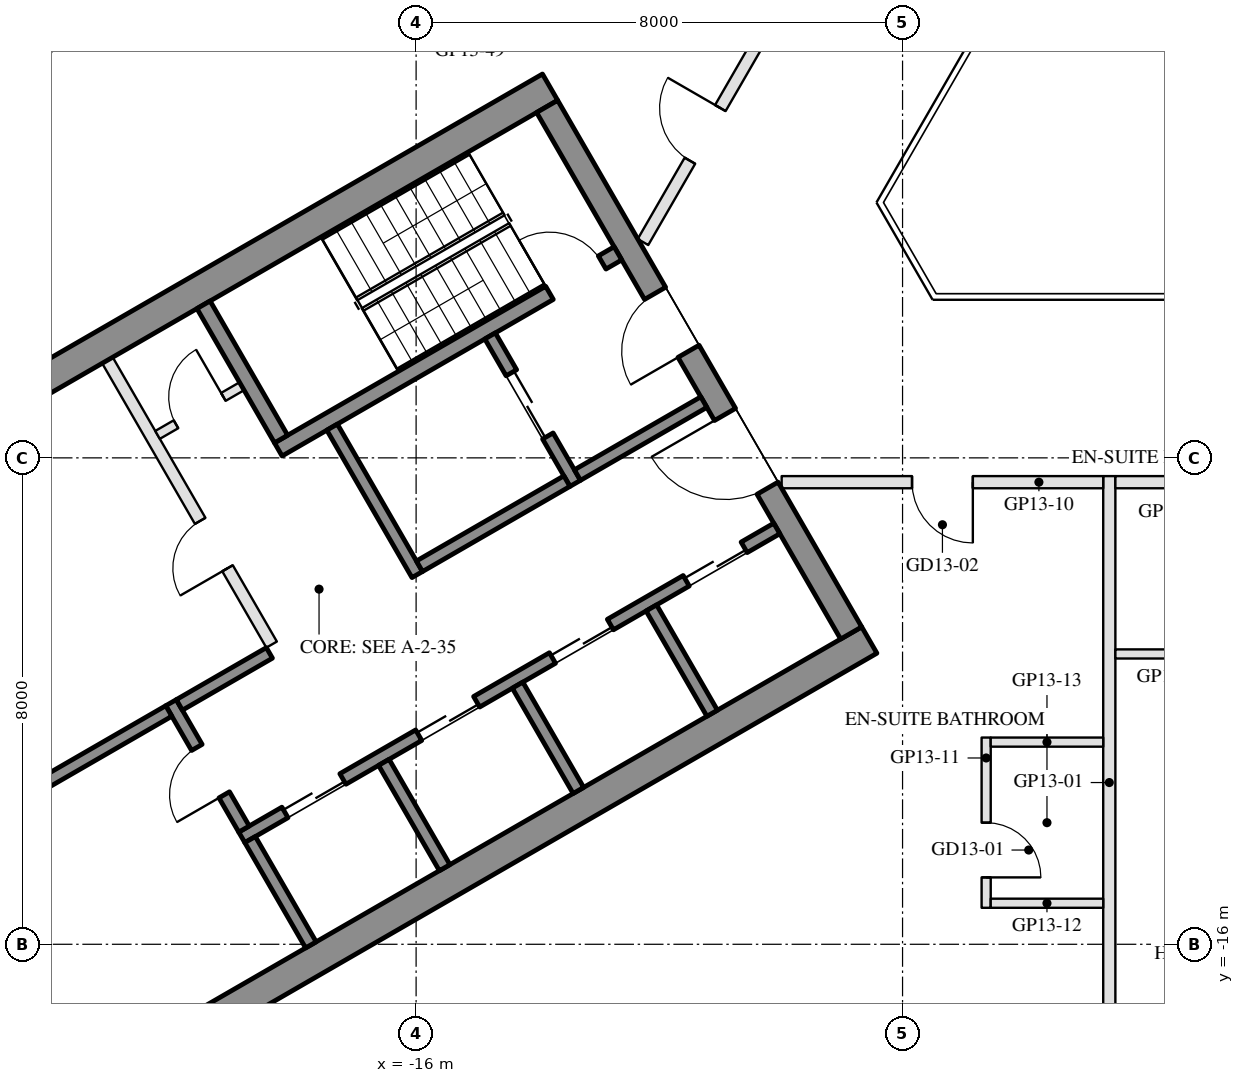
"""IFC4 building model, lengths in metres.
Left out: names, types, materials, properties, quantities, classifications, styles, units other than length and angle.
Written with IfcOpenShell. Run it as: python <this file> out.ifc"""

import sys

from ifc_helpers import new_model, si_unit, direction, frame, frame_2d, origin, place, context, subcontext, project, spatial, rectangle, extrude, element, fill, save


model = new_model("IFC4")
c1 = context("Model", 3, precision=1e-05, world=origin(), true_north=direction((0.0, 1.0)))
c2 = subcontext(c1, "Body", "Model", "MODEL_VIEW")
j1 = project(units=[si_unit("LENGTHUNIT", "METRE"), si_unit("PLANEANGLEUNIT", "RADIAN")], contexts=[c1])
p1 = place(None, origin())
s1 = spatial("IfcSite", under=j1, at=p1, CompositionType="ELEMENT")
p2 = place(p1, origin())
s2 = spatial("IfcBuilding", under=s1, at=p2, CompositionType="ELEMENT")
p3 = place(p2, frame((0.0, 0.0, 154.0)))
s3 = spatial("IfcBuildingStorey", under=s2, at=p3, CompositionType="ELEMENT", Elevation=154.0)
p4 = place(p3, frame((-20.309, 1.934, 0.0), z_axis=(0.0, 0.0, 1.0), x_axis=(-0.499992114976, -0.866029956157, 0.0)))
e1 = element("IfcWall", 1, at=p4, inside=s3, PredefinedType="SOLIDWALL", context=c2, shape_type="SweptSolid", body=[
    extrude(rectangle(XDim=6.74, YDim=0.35, at=frame_2d((3.37, 0.0))), origin(), (0.0, 0.0, 1.0), 3.55),
])
p5 = place(p4, frame((0.77, 0.0, 0.0)))
e2 = element("IfcOpeningElement", 2, at=p5, cuts=e1, PredefinedType="OPENING", context=c2, shape_type="SweptSolid", body=[
    extrude(rectangle(XDim=2.4, YDim=2.4, at=frame_2d((1.2, 1.2))), frame((0.0, 0.185, 0.0), z_axis=(0.0, -1.0, 0.0), x_axis=(1.0, 0.0, 0.0)), (0.0, 0.0, 1.0), 0.37),
])
p6 = place(p4, frame((3.47, 0.0, 0.3)))
e3 = element("IfcOpeningElement", 3, at=p6, cuts=e1, PredefinedType="OPENING", context=c2, shape_type="SweptSolid", body=[
    extrude(rectangle(XDim=2.9, YDim=2.65, at=frame_2d((1.45, 1.325))), frame((0.0, 0.185, 0.0), z_axis=(0.0, -1.0, 0.0), x_axis=(1.0, 0.0, 0.0)), (0.0, 0.0, 1.0), 0.37),
])
for number, where, z_axis, x_axis in (
    (4, (-13.797, -1.903, 0.0), (0.0, 0.0, 1.0), (-0.866, -0.5, 0.0)),
    (5, (-8.547, -10.997, 0.0), (0.0, 0.0, 1.0), (-0.866, -0.5, 0.0)),
):
    element("IfcWall", number, at=place(p3, frame(where, z_axis=z_axis, x_axis=x_axis)), inside=s3, PredefinedType="SHEAR", context=c2, shape_type="SweptSolid", body=[
        extrude(rectangle(XDim=14.837, YDim=0.5, at=frame_2d((7.418, 0.0))), origin(), (0.0, 0.0, 1.0), 3.5),
    ])
p7 = place(p3, frame((-13.845, -2.22, 0.0), z_axis=(0.0, 0.0, 1.0), x_axis=(0.500004234368, -0.866022959057, 0.0)))
e6 = element("IfcWall", 6, at=p7, inside=s3, PredefinedType="SHEAR", context=c2, shape_type="SweptSolid", body=[
    extrude(rectangle(XDim=10.0, YDim=0.4, at=frame_2d((5.0, 0.0))), origin(), (0.0, 0.0, 1.0), 3.5),
])
p8 = place(p7, frame((3.55, 0.0, 0.0)))
e7 = element("IfcOpeningElement", 7, at=p8, cuts=e6, PredefinedType="OPENING", context=c2, shape_type="SweptSolid", body=[
    extrude(rectangle(XDim=1.1, YDim=2.1, at=frame_2d((0.55, 1.05))), frame((0.0, 0.21, 0.0), z_axis=(0.0, -1.0, 0.0), x_axis=(1.0, 0.0, 0.0)), (0.0, 0.0, 1.0), 0.42),
])
p9 = place(p7, frame((5.85, 0.0, 0.0)))
e8 = element("IfcOpeningElement", 8, at=p9, cuts=e6, PredefinedType="OPENING", context=c2, shape_type="SweptSolid", body=[
    extrude(rectangle(XDim=1.4, YDim=2.1, at=frame_2d((0.7, 1.05))), frame((0.0, 0.21, 0.0), z_axis=(0.0, -1.0, 0.0), x_axis=(1.0, 0.0, 0.0)), (0.0, 0.0, 1.0), 0.42),
])
p10 = place(p3, frame((-12.681, -4.636, 0.0), z_axis=(0.0, 0.0, 1.0), x_axis=(-0.866021702275, -0.500006411147, 0.0)))
e9 = element("IfcWall", 9, at=p10, inside=s3, PredefinedType="SHEAR", context=c2, shape_type="SweptSolid", body=[
    extrude(rectangle(XDim=6.45, YDim=0.25, at=frame_2d((3.225, 0.0))), origin(), (0.0, 0.0, 1.0), 3.5),
])
p11 = place(p10, frame((0.3, 0.0, 0.0)))
e10 = element("IfcOpeningElement", 10, at=p11, cuts=e9, PredefinedType="OPENING", context=c2, shape_type="SweptSolid", body=[
    extrude(rectangle(XDim=1.0, YDim=2.1, at=frame_2d((0.5, 1.05))), frame((0.0, 0.135, 0.0), z_axis=(0.0, -1.0, 0.0), x_axis=(1.0, 0.0, 0.0)), (0.0, 0.0, 1.0), 0.27),
])
p12 = place(p3, frame((-19.496, -5.482, 0.0), z_axis=(0.0, 0.0, 1.0), x_axis=(0.499990435942, -0.866030925526, 0.0)))
e11 = element("IfcWall", 11, at=p12, inside=s3, PredefinedType="SHEAR", context=c2, shape_type="SweptSolid", body=[
    extrude(rectangle(XDim=2.55, YDim=0.25, at=frame_2d((1.275, 0.0))), origin(), (0.0, 0.0, 1.0), 3.5),
])
p13 = place(p3, frame((-17.381, -7.495, 0.0), z_axis=(0.0, 0.0, 1.0), x_axis=(0.500011755427, -0.866018616679, 0.0)))
e12 = element("IfcWall", 12, at=p13, inside=s3, PredefinedType="SHEAR", context=c2, shape_type="SweptSolid", body=[
    extrude(rectangle(XDim=2.8, YDim=0.2, at=frame_2d((1.4, 0.0))), origin(), (0.0, 0.0, 1.0), 3.5),
])
p14 = place(p3, frame((-14.783, -5.995, 0.0), z_axis=(0.0, 0.0, 1.0), x_axis=(0.49994636267, -0.866056369097, 0.0)))
e13 = element("IfcWall", 13, at=p14, inside=s3, PredefinedType="SHEAR", context=c2, shape_type="SweptSolid", body=[
    extrude(rectangle(XDim=2.8, YDim=0.2, at=frame_2d((1.4, 0.0))), origin(), (0.0, 0.0, 1.0), 3.5),
])
p15 = place(p14, frame((0.7, 0.0, 0.0)))
e14 = element("IfcOpeningElement", 14, at=p15, cuts=e13, PredefinedType="OPENING", context=c2, shape_type="SweptSolid", body=[
    extrude(rectangle(XDim=1.2, YDim=2.1, at=frame_2d((0.6, 1.05))), frame((0.0, 0.11, 0.0), z_axis=(0.0, -1.0, 0.0), x_axis=(1.0, 0.0, 0.0)), (0.0, 0.0, 1.0), 0.22),
])
p16 = place(p3, frame((-13.52, -8.383, 0.0), z_axis=(0.0, 0.0, 1.0), x_axis=(-0.866034573852, -0.49998411664, 0.0)))
e15 = element("IfcWall", 15, at=p16, inside=s3, PredefinedType="SHEAR", context=c2, shape_type="SweptSolid", body=[
    extrude(rectangle(XDim=2.8, YDim=0.2, at=frame_2d((1.4, 0.0))), origin(), (0.0, 0.0, 1.0), 3.5),
])
p17 = place(p3, frame((-11.268, -7.083, 0.0), z_axis=(0.0, 0.0, 1.0), x_axis=(-0.866050077142, -0.499957262057, 0.0)))
e16 = element("IfcWall", 16, at=p17, inside=s3, PredefinedType="SHEAR", context=c2, shape_type="SweptSolid", body=[
    extrude(rectangle(XDim=2.4, YDim=0.2, at=frame_2d((1.2, 0.0))), origin(), (0.0, 0.0, 1.0), 3.5),
])
p18 = place(p3, frame((-10.068, -9.162, 0.0), z_axis=(0.0, 0.0, 1.0), x_axis=(-0.866032725843, -0.499987317609, 0.0)))
e17 = element("IfcWall", 17, at=p18, inside=s3, PredefinedType="SHEAR", context=c2, shape_type="SweptSolid", body=[
    extrude(rectangle(XDim=10.16, YDim=0.2, at=frame_2d((5.08, 0.0))), origin(), (0.0, 0.0, 1.0), 3.5),
])
p19 = place(p18, frame((0.62, 0.0, 0.0)))
e18 = element("IfcOpeningElement", 18, at=p19, cuts=e17, PredefinedType="OPENING", context=c2, shape_type="SweptSolid", body=[
    extrude(rectangle(XDim=1.1, YDim=2.1, at=frame_2d((0.55, 1.05))), frame((0.0, 0.11, 0.0), z_axis=(0.0, -1.0, 0.0), x_axis=(1.0, 0.0, 0.0)), (0.0, 0.0, 1.0), 0.22),
])
p20 = place(p18, frame((3.16, 0.0, 0.0)))
e19 = element("IfcOpeningElement", 19, at=p20, cuts=e17, PredefinedType="OPENING", context=c2, shape_type="SweptSolid", body=[
    extrude(rectangle(XDim=1.1, YDim=2.1, at=frame_2d((0.55, 1.05))), frame((0.0, 0.11, 0.0), z_axis=(0.0, -1.0, 0.0), x_axis=(1.0, 0.0, 0.0)), (0.0, 0.0, 1.0), 0.22),
])
p21 = place(p18, frame((5.7, 0.0, 0.0)))
e20 = element("IfcOpeningElement", 20, at=p21, cuts=e17, PredefinedType="OPENING", context=c2, shape_type="SweptSolid", body=[
    extrude(rectangle(XDim=1.1, YDim=2.1, at=frame_2d((0.55, 1.05))), frame((0.0, 0.11, 0.0), z_axis=(0.0, -1.0, 0.0), x_axis=(1.0, 0.0, 0.0)), (0.0, 0.0, 1.0), 0.22),
])
p22 = place(p18, frame((8.24, 0.0, 0.0)))
e21 = element("IfcOpeningElement", 21, at=p22, cuts=e17, PredefinedType="OPENING", context=c2, shape_type="SweptSolid", body=[
    extrude(rectangle(XDim=1.1, YDim=2.1, at=frame_2d((0.55, 1.05))), frame((0.0, 0.11, 0.0), z_axis=(0.0, -1.0, 0.0), x_axis=(1.0, 0.0, 0.0)), (0.0, 0.0, 1.0), 0.22),
])
p23 = place(p3, frame((-20.031, -12.026, 0.0), z_axis=(0.0, 0.0, 1.0), x_axis=(0.500033551112, -0.866006032174, 0.0)))
e22 = element("IfcWall", 22, at=p23, inside=s3, PredefinedType="SHEAR", context=c2, shape_type="SweptSolid", body=[
    extrude(rectangle(XDim=2.4, YDim=0.2, at=frame_2d((1.2, 0.0))), origin(), (0.0, 0.0, 1.0), 3.5),
])
p24 = place(p23, frame((0.85, 0.0, 0.0)))
e23 = element("IfcOpeningElement", 23, at=p24, cuts=e22, PredefinedType="OPENING", context=c2, shape_type="SweptSolid", body=[
    extrude(rectangle(XDim=0.9, YDim=2.1, at=frame_2d((0.45, 1.05))), frame((0.0, 0.11, 0.0), z_axis=(0.0, -1.0, 0.0), x_axis=(1.0, 0.0, 0.0)), (0.0, 0.0, 1.0), 0.22),
])
p25 = place(p3, frame((-18.413, -11.208, 0.0), z_axis=(0.0, 0.0, 1.0), x_axis=(-0.866038183914, -0.499977863513, 0.0)))
e24 = element("IfcWall", 24, at=p25, inside=s3, PredefinedType="SHEAR", context=c2, shape_type="SweptSolid", body=[
    extrude(rectangle(XDim=1.71, YDim=0.2, at=frame_2d((0.855, 0.0))), origin(), (0.0, 0.0, 1.0), 3.5),
])
for number, where, z_axis, x_axis in (
    (25, (-12.131, -10.468, 0.0), (0.0, 0.0, 1.0), (0.5, -0.866, 0.0)),
    (26, (-14.331, -11.738, 0.0), (0.0, 0.0, 1.0), (0.5, -0.866, 0.0)),
    (27, (-16.531, -13.008, 0.0), (0.0, 0.0, 1.0), (0.5, -0.866, 0.0)),
    (28, (-18.73, -14.278, 0.0), (0.0, 0.0, 1.0), (0.5, -0.866, 0.0)),
):
    element("IfcWall", number, at=place(p3, frame(where, z_axis=z_axis, x_axis=x_axis)), inside=s3, PredefinedType="SHEAR", context=c2, shape_type="SweptSolid", body=[
        extrude(rectangle(XDim=2.0, YDim=0.2, at=frame_2d((1.0, 0.0))), origin(), (0.0, 0.0, 1.0), 3.5),
    ])
p26 = place(p3, frame((-20.067, -12.163, 0.0), z_axis=(0.0, 0.0, 1.0), x_axis=(-0.866055327414, -0.49994816717, 0.0)))
e29 = element("IfcWall", 29, at=p26, inside=s3, PredefinedType="SHEAR", context=c2, shape_type="SweptSolid", body=[
    extrude(rectangle(XDim=2.84, YDim=0.2, at=frame_2d((1.42, 0.0))), origin(), (0.0, 0.0, 1.0), 3.5),
])
p27 = place(p3, frame((-21.076, -6.395, 0.0), z_axis=(0.0, 0.0, 1.0), x_axis=(0.50001468107, -0.866016927499, 0.0)))
e30 = element("IfcWall", 30, at=p27, inside=s3, PredefinedType="PARTITIONING", context=c2, shape_type="SweptSolid", body=[
    extrude(rectangle(XDim=5.4, YDim=0.2, at=frame_2d((2.7, 0.0))), origin(), (0.0, 0.0, 1.0), 3.5),
])
p28 = place(p27, frame((3.05, 0.0, 0.0)))
e31 = element("IfcOpeningElement", 31, at=p28, cuts=e30, PredefinedType="OPENING", context=c2, shape_type="SweptSolid", body=[
    extrude(rectangle(XDim=0.9, YDim=2.1, at=frame_2d((0.45, 1.05))), frame((0.0, 0.11, 0.0), z_axis=(0.0, -1.0, 0.0), x_axis=(1.0, 0.0, 0.0)), (0.0, 0.0, 1.0), 0.22),
])
p29 = place(p3, frame((-18.866, -6.822, 0.0), z_axis=(0.0, 0.0, 1.0), x_axis=(-0.866028054938, -0.499995408039, 0.0)))
e32 = element("IfcWall", 32, at=p29, inside=s3, PredefinedType="PARTITIONING", context=c2, shape_type="SweptSolid", body=[
    extrude(rectangle(XDim=1.6, YDim=0.15, at=frame_2d((0.8, 0.0))), origin(), (0.0, 0.0, 1.0), 3.5),
])
p30 = place(p29, frame((0.35, 0.0, 0.0)))
e33 = element("IfcOpeningElement", 33, at=p30, cuts=e32, PredefinedType="OPENING", context=c2, shape_type="SweptSolid", body=[
    extrude(rectangle(XDim=0.9, YDim=2.1, at=frame_2d((0.45, 1.05))), frame((0.0, 0.085, 0.0), z_axis=(0.0, -1.0, 0.0), x_axis=(1.0, 0.0, 0.0)), (0.0, 0.0, 1.0), 0.17),
])
p31 = place(p3, frame((-4.6, -18.38, 0.0), z_axis=(0.0, 0.0, 1.0), x_axis=(0.0, 1.0, 0.0)))
e34 = element("IfcWall", 34, at=p31, inside=s3, PredefinedType="PARTITIONING", context=c2, shape_type="SweptSolid", body=[
    extrude(rectangle(XDim=10.08, YDim=0.2, at=frame_2d((5.04, 0.0))), origin(), (0.0, 0.0, 1.0), 3.06),
])
p32 = place(p3, frame((-4.7, -8.4, 0.0), z_axis=(0.0, 0.0, 1.0), x_axis=(-1.0, 0.0, 0.0)))
e35 = element("IfcWall", 35, at=p32, inside=s3, PredefinedType="PARTITIONING", context=c2, shape_type="SweptSolid", body=[
    extrude(rectangle(XDim=5.288, YDim=0.2, at=frame_2d((2.644, 0.0))), origin(), (0.0, 0.0, 1.0), 2.95),
])
p33 = place(p32, frame((2.144, 0.0, 0.0)))
e36 = element("IfcOpeningElement", 36, at=p33, cuts=e35, PredefinedType="OPENING", context=c2, shape_type="SweptSolid", body=[
    extrude(rectangle(XDim=1.0, YDim=2.1, at=frame_2d((0.5, 1.05))), frame((0.0, 0.11, 0.0), z_axis=(0.0, -1.0, 0.0), x_axis=(1.0, 0.0, 0.0)), (0.0, 0.0, 1.0), 0.22),
])
p34 = place(p3, frame((-6.625, -12.6, 0.0), z_axis=(0.0, 0.0, 1.0), x_axis=(0.0, -1.0, 0.0)))
e37 = element("IfcWall", 37, at=p34, inside=s3, PredefinedType="PARTITIONING", context=c2, shape_type="SweptSolid", body=[
    extrude(rectangle(XDim=2.8, YDim=0.15, at=frame_2d((1.4, 0.0))), origin(), (0.0, 0.0, 1.0), 3.55),
])
p35 = place(p34, frame((1.4, 0.0, 0.0)))
e38 = element("IfcOpeningElement", 38, at=p35, cuts=e37, PredefinedType="OPENING", context=c2, shape_type="SweptSolid", body=[
    extrude(rectangle(XDim=0.9, YDim=2.1, at=frame_2d((0.45, 1.05))), frame((0.0, 0.085, 0.0), z_axis=(0.0, -1.0, 0.0), x_axis=(1.0, 0.0, 0.0)), (0.0, 0.0, 1.0), 0.17),
])
for number, where, z_axis, x_axis in (
    (39, (-6.55, -15.325, 0.0), (0.0, 0.0, 1.0), (1.0, 0.0, 0.0)),
    (40, (-6.55, -12.675, 0.0), (0.0, 0.0, 1.0), (1.0, 0.0, 0.0)),
):
    element("IfcWall", number, at=place(p3, frame(where, z_axis=z_axis, x_axis=x_axis)), inside=s3, PredefinedType="PARTITIONING", context=c2, shape_type="SweptSolid", body=[
        extrude(rectangle(XDim=1.85, YDim=0.15, at=frame_2d((0.925, 0.0))), origin(), (0.0, 0.0, 1.0), 3.55),
    ])
p36 = place(p3, frame((0.304, -8.4, 0.0), z_axis=(0.0, 0.0, 1.0), x_axis=(-1.0, 0.0, 0.0)))
e41 = element("IfcWall", 41, at=p36, inside=s3, PredefinedType="PARTITIONING", context=c2, shape_type="SweptSolid", body=[
    extrude(rectangle(XDim=4.804, YDim=0.2, at=frame_2d((2.402, 0.0))), origin(), (0.0, 0.0, 1.0), 2.95),
])
p37 = place(p36, frame((1.354, 0.0, 0.0)))
e42 = element("IfcOpeningElement", 42, at=p37, cuts=e41, PredefinedType="OPENING", context=c2, shape_type="SweptSolid", body=[
    extrude(rectangle(XDim=1.0, YDim=2.1, at=frame_2d((0.5, 1.05))), frame((0.0, 0.11, 0.0), z_axis=(0.0, -1.0, 0.0), x_axis=(1.0, 0.0, 0.0)), (0.0, 0.0, 1.0), 0.22),
])
p38 = place(p3, frame((-4.5, -11.225, 0.0), z_axis=(0.0, 0.0, 1.0), x_axis=(1.0, 0.0, 0.0)))
e43 = element("IfcWall", 43, at=p38, inside=s3, PredefinedType="PARTITIONING", context=c2, shape_type="SweptSolid", body=[
    extrude(rectangle(XDim=1.85, YDim=0.15, at=frame_2d((0.925, 0.0))), origin(), (0.0, 0.0, 1.0), 2.95),
])
p39 = place(p3, frame((-12.269, -4.45, 0.0), z_axis=(0.0, 0.0, 1.0), x_axis=(0.500011931275, 0.86601851515, 0.0)))
e44 = element("IfcWall", 44, at=p39, inside=s3, PredefinedType="PARTITIONING", context=c2, shape_type="SweptSolid", body=[
    extrude(rectangle(XDim=4.088, YDim=0.2, at=frame_2d((2.044, 0.0))), origin(), (0.0, 0.0, 1.0), 2.95),
])
p40 = place(p39, frame((1.544, 0.0, 0.0)))
e45 = element("IfcOpeningElement", 45, at=p40, cuts=e44, PredefinedType="OPENING", context=c2, shape_type="SweptSolid", body=[
    extrude(rectangle(XDim=1.0, YDim=2.1, at=frame_2d((0.5, 1.05))), frame((0.0, 0.11, 0.0), z_axis=(0.0, -1.0, 0.0), x_axis=(1.0, 0.0, 0.0)), (0.0, 0.0, 1.0), 0.22),
])
p41 = place(p15, origin())
e46 = element("IfcDoor", 46, at=p41, inside=s3, OperationType="DOUBLE_DOOR_SLIDING", PredefinedType="DOOR", context=c2, shape_type="SweptSolid", body=[
    extrude(rectangle(XDim=1.2, YDim=2.1, at=frame_2d((0.6, 1.05))), frame((0.0, 0.025, 0.0), z_axis=(0.0, -1.0, 0.0), x_axis=(1.0, 0.0, 0.0)), (0.0, 0.0, 1.0), 0.05),
])
fill(e14, e46)
p42 = place(p30, frame((0.9, 0.0, 0.0), z_axis=(0.0, 0.0, 1.0), x_axis=(-1.0, 0.0, 0.0)))
e47 = element("IfcDoor", 47, at=p42, inside=s3, OperationType="SINGLE_SWING_RIGHT", PredefinedType="DOOR", context=c2, shape_type="SweptSolid", body=[
    extrude(rectangle(XDim=0.9, YDim=2.1, at=frame_2d((0.45, 1.05))), frame((0.0, 0.025, 0.0), z_axis=(0.0, -1.0, 0.0), x_axis=(1.0, 0.0, 0.0)), (0.0, 0.0, 1.0), 0.05),
])
fill(e33, e47)
p43 = place(p19, origin())
e48 = element("IfcDoor", 48, at=p43, inside=s3, OperationType="DOUBLE_DOOR_SLIDING", PredefinedType="DOOR", context=c2, shape_type="SweptSolid", body=[
    extrude(rectangle(XDim=1.1, YDim=2.1, at=frame_2d((0.55, 1.05))), frame((0.0, 0.025, 0.0), z_axis=(0.0, -1.0, 0.0), x_axis=(1.0, 0.0, 0.0)), (0.0, 0.0, 1.0), 0.05),
])
fill(e18, e48)
p44 = place(p20, origin())
e49 = element("IfcDoor", 49, at=p44, inside=s3, OperationType="DOUBLE_DOOR_SLIDING", PredefinedType="DOOR", context=c2, shape_type="SweptSolid", body=[
    extrude(rectangle(XDim=1.1, YDim=2.1, at=frame_2d((0.55, 1.05))), frame((0.0, 0.025, 0.0), z_axis=(0.0, -1.0, 0.0), x_axis=(1.0, 0.0, 0.0)), (0.0, 0.0, 1.0), 0.05),
])
fill(e19, e49)
p45 = place(p21, origin())
e50 = element("IfcDoor", 50, at=p45, inside=s3, OperationType="DOUBLE_DOOR_SLIDING", PredefinedType="DOOR", context=c2, shape_type="SweptSolid", body=[
    extrude(rectangle(XDim=1.1, YDim=2.1, at=frame_2d((0.55, 1.05))), frame((0.0, 0.025, 0.0), z_axis=(0.0, -1.0, 0.0), x_axis=(1.0, 0.0, 0.0)), (0.0, 0.0, 1.0), 0.05),
])
fill(e20, e50)
p46 = place(p22, origin())
e51 = element("IfcDoor", 51, at=p46, inside=s3, OperationType="DOUBLE_DOOR_SLIDING", PredefinedType="DOOR", context=c2, shape_type="SweptSolid", body=[
    extrude(rectangle(XDim=1.1, YDim=2.1, at=frame_2d((0.55, 1.05))), frame((0.0, 0.025, 0.0), z_axis=(0.0, -1.0, 0.0), x_axis=(1.0, 0.0, 0.0)), (0.0, 0.0, 1.0), 0.05),
])
fill(e21, e51)
p47 = place(p24, frame((0.9, 0.0, 0.0), z_axis=(0.0, 0.0, 1.0), x_axis=(-1.0, 0.0, 0.0)))
e52 = element("IfcDoor", 52, at=p47, inside=s3, OperationType="SINGLE_SWING_LEFT", PredefinedType="DOOR", context=c2, shape_type="SweptSolid", body=[
    extrude(rectangle(XDim=0.9, YDim=2.1, at=frame_2d((0.45, 1.05))), frame((0.0, 0.025, 0.0), z_axis=(0.0, -1.0, 0.0), x_axis=(1.0, 0.0, 0.0)), (0.0, 0.0, 1.0), 0.05),
])
fill(e23, e52)
p48 = place(p28, frame((0.9, 0.0, 0.0), z_axis=(0.0, 0.0, 1.0), x_axis=(-1.0, 0.0, 0.0)))
e53 = element("IfcDoor", 53, at=p48, inside=s3, OperationType="SINGLE_SWING_LEFT", PredefinedType="DOOR", context=c2, shape_type="SweptSolid", body=[
    extrude(rectangle(XDim=0.9, YDim=2.1, at=frame_2d((0.45, 1.05))), frame((0.0, 0.025, 0.0), z_axis=(0.0, -1.0, 0.0), x_axis=(1.0, 0.0, 0.0)), (0.0, 0.0, 1.0), 0.05),
])
fill(e31, e53)
p49 = place(p8, frame((1.1, 0.0, 0.0), z_axis=(0.0, 0.0, 1.0), x_axis=(-1.0, 0.0, 0.0)))
e54 = element("IfcDoor", 54, at=p49, inside=s3, OperationType="SINGLE_SWING_LEFT", PredefinedType="DOOR", context=c2, shape_type="SweptSolid", body=[
    extrude(rectangle(XDim=1.1, YDim=2.1, at=frame_2d((0.55, 1.05))), frame((0.0, 0.025, 0.0), z_axis=(0.0, -1.0, 0.0), x_axis=(1.0, 0.0, 0.0)), (0.0, 0.0, 1.0), 0.05),
])
fill(e7, e54)
p50 = place(p9, frame((1.4, 0.0, 0.0), z_axis=(0.0, 0.0, 1.0), x_axis=(-1.0, 0.0, 0.0)))
e55 = element("IfcDoor", 55, at=p50, inside=s3, OperationType="DOUBLE_DOOR_SINGLE_SWING", PredefinedType="DOOR", context=c2, shape_type="SweptSolid", body=[
    extrude(rectangle(XDim=1.4, YDim=2.1, at=frame_2d((0.7, 1.05))), frame((0.0, 0.025, 0.0), z_axis=(0.0, -1.0, 0.0), x_axis=(1.0, 0.0, 0.0)), (0.0, 0.0, 1.0), 0.05),
])
fill(e8, e55)
p51 = place(p11, frame((1.0, 0.0, 0.0), z_axis=(0.0, 0.0, 1.0), x_axis=(-1.0, 0.0, 0.0)))
e56 = element("IfcDoor", 56, at=p51, inside=s3, OperationType="SINGLE_SWING_LEFT", PredefinedType="DOOR", context=c2, shape_type="SweptSolid", body=[
    extrude(rectangle(XDim=1.0, YDim=2.1, at=frame_2d((0.5, 1.05))), frame((0.0, 0.025, 0.0), z_axis=(0.0, -1.0, 0.0), x_axis=(1.0, 0.0, 0.0)), (0.0, 0.0, 1.0), 0.05),
])
fill(e10, e56)
p52 = place(p35, origin())
e57 = element("IfcDoor", 57, at=p52, inside=s3, OperationType="SINGLE_SWING_RIGHT", PredefinedType="DOOR", context=c2, shape_type="SweptSolid", body=[
    extrude(rectangle(XDim=0.9, YDim=2.1, at=frame_2d((0.45, 1.05))), frame((0.0, 0.025, 0.0), z_axis=(0.0, -1.0, 0.0), x_axis=(1.0, 0.0, 0.0)), (0.0, 0.0, 1.0), 0.05),
])
fill(e38, e57)
p53 = place(p33, origin())
e58 = element("IfcDoor", 58, at=p53, inside=s3, OperationType="SINGLE_SWING_LEFT", PredefinedType="DOOR", context=c2, shape_type="SweptSolid", body=[
    extrude(rectangle(XDim=1.0, YDim=2.1, at=frame_2d((0.5, 1.05))), frame((0.0, 0.025, 0.0), z_axis=(0.0, -1.0, 0.0), x_axis=(1.0, 0.0, 0.0)), (0.0, 0.0, 1.0), 0.05),
])
fill(e36, e58)
p54 = place(p40, origin())
e59 = element("IfcDoor", 59, at=p54, inside=s3, OperationType="SINGLE_SWING_RIGHT", PredefinedType="DOOR", context=c2, shape_type="SweptSolid", body=[
    extrude(rectangle(XDim=1.0, YDim=2.1, at=frame_2d((0.5, 1.05))), frame((0.0, 0.025, 0.0), z_axis=(0.0, -1.0, 0.0), x_axis=(1.0, 0.0, 0.0)), (0.0, 0.0, 1.0), 0.05),
])
fill(e45, e59)
save(model, sys.argv[1])
